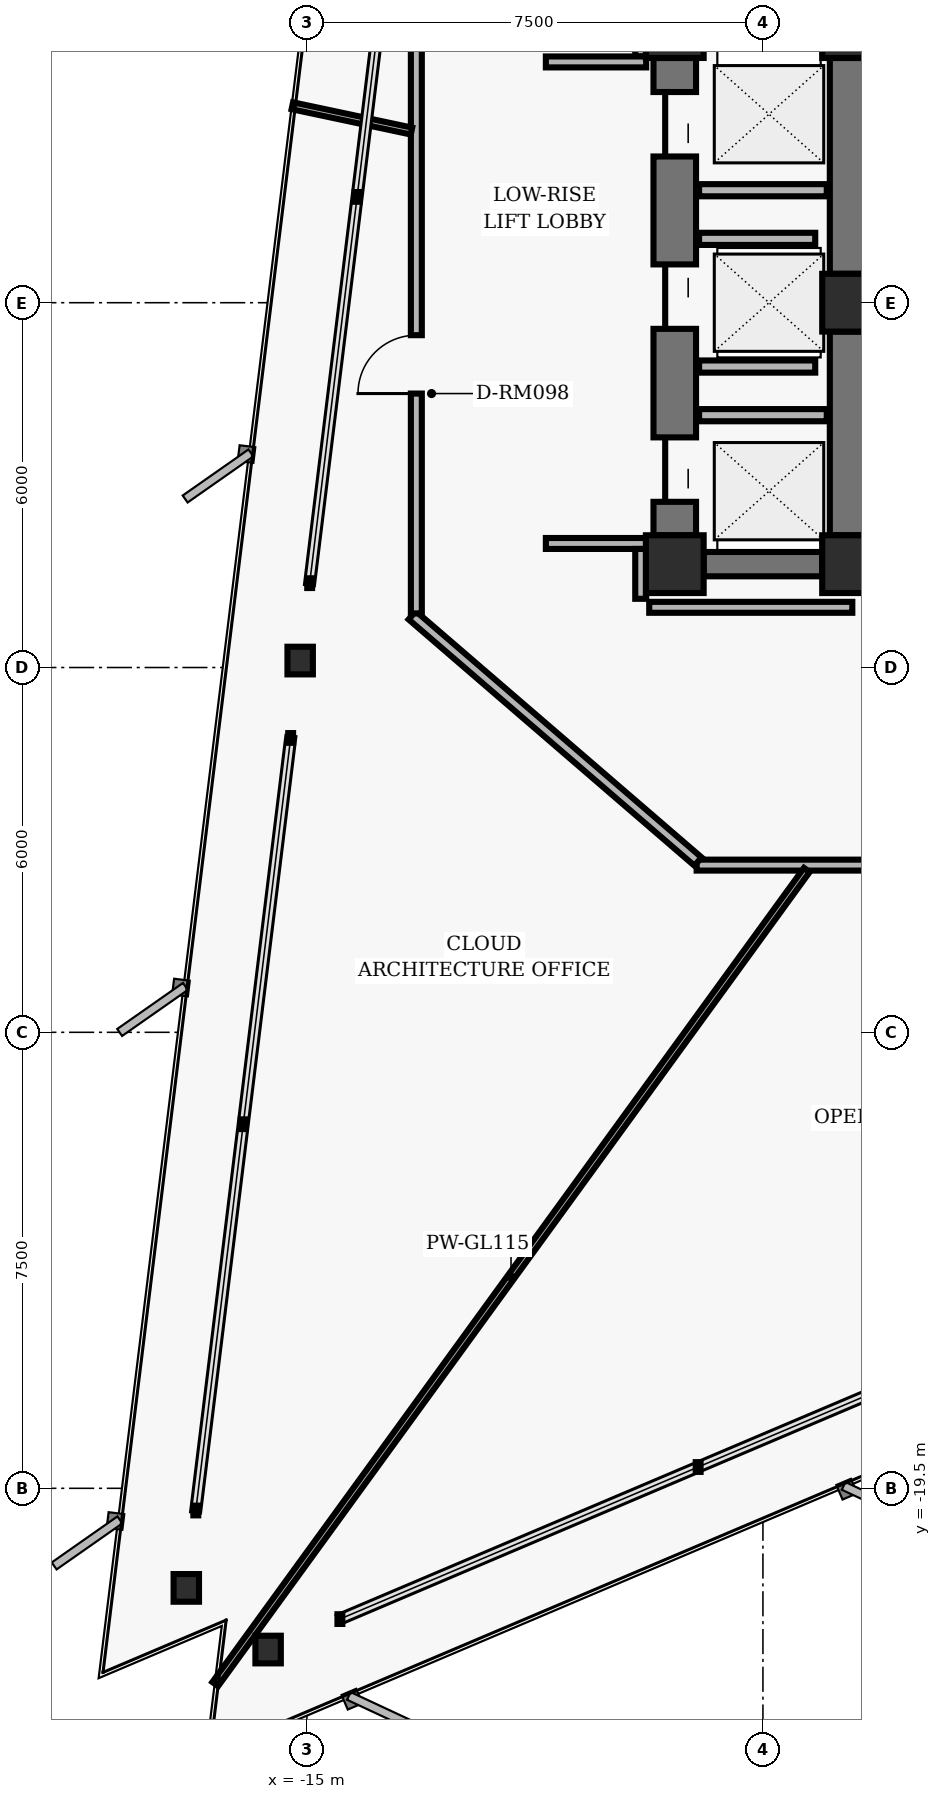
"""IFC4 building model, lengths in metres.
Left out: names, types, materials, properties, quantities, classifications, styles, units other than length and angle.
Written with IfcOpenShell. Run it as: python <this file> out.ifc"""

import sys

from ifc_helpers import new_model, si_unit, direction, frame, frame_2d, origin, origin_2d, place, context, subcontext, project, spatial, rectangle, hollow_rectangle, i_section, extrude, element, fill, save


model = new_model("IFC4")
c1 = context("Model", 3, precision=1e-05, world=origin(), true_north=direction((0.0, 1.0)))
c2 = subcontext(c1, "Body", "Model", "MODEL_VIEW")
j1 = project(units=[si_unit("LENGTHUNIT", "METRE"), si_unit("PLANEANGLEUNIT", "RADIAN")], contexts=[c1])
p1 = place(None, origin())
s1 = spatial("IfcSite", under=j1, at=p1, CompositionType="ELEMENT")
p2 = place(p1, origin())
s2 = spatial("IfcBuilding", under=s1, at=p2, CompositionType="ELEMENT")
p3 = place(p2, frame((0.0, 0.0, 73.12)))
s3 = spatial("IfcBuildingStorey", under=s2, at=p3, CompositionType="ELEMENT", Elevation=73.12)
for number, where, z_axis, x_axis in (
    (1, (-6.05, 4.5, 0.0), (0.0, 0.0, 1.0), (1.0, 0.0, 0.0)),
    (2, (-6.05, 0.0, 0.0), (0.0, 0.0, 1.0), (1.0, 0.0, 0.0)),
    (3, (-6.05, -4.3, 0.0), (0.0, 0.0, 1.0), (1.0, 0.0, 0.0)),
    (4, (-8.95, 4.5, 0.0), (0.0, 0.0, 1.0), (1.0, 0.0, 0.0)),
    (5, (-8.95, -4.3, 0.0), (0.0, 0.0, 1.0), (1.0, 0.0, 0.0)),
):
    element("IfcColumn", number, at=place(p3, frame(where, z_axis=z_axis, x_axis=x_axis)), inside=s3, PredefinedType="COLUMN", context=c2, shape_type="SweptSolid", body=[
        extrude(hollow_rectangle(XDim=0.95, YDim=0.95, WallThickness=0.06, InnerFilletRadius=0.02, OuterFilletRadius=0.04, at=origin_2d()), origin(), (0.0, 0.0, 1.0), 3.36),
    ])
p4 = place(p3, frame((-6.05, 0.475, 0.0), z_axis=(0.0, 0.0, 1.0), x_axis=(0.0, 1.0, 0.0)))
e6 = element("IfcWall", 6, at=p4, inside=s3, PredefinedType="SHEAR", context=c2, shape_type="SweptSolid", body=[
    extrude(rectangle(XDim=3.55, YDim=0.7, at=frame_2d((1.775, 0.0))), origin(), (0.0, 0.0, 1.0), 2.938),
])
p5 = place(p3, frame((-6.05, -3.825, 0.0), z_axis=(0.0, 0.0, 1.0), x_axis=(0.0, 1.0, 0.0)))
e7 = element("IfcWall", 7, at=p5, inside=s3, PredefinedType="SHEAR", context=c2, shape_type="SweptSolid", body=[
    extrude(rectangle(XDim=3.35, YDim=0.7, at=frame_2d((1.675, 0.0))), origin(), (0.0, 0.0, 1.0), 2.938),
])
p6 = place(p3, frame((-8.95, -3.825, 0.0), z_axis=(0.0, 0.0, 1.0), x_axis=(0.0, 1.0, 0.0)))
e8 = element("IfcWall", 8, at=p6, inside=s3, PredefinedType="SHEAR", context=c2, shape_type="SweptSolid", body=[
    extrude(rectangle(XDim=7.85, YDim=0.7, at=frame_2d((3.925, 0.0))), origin(), (0.0, 0.0, 1.0), 2.938),
])
p7 = place(p6, frame((0.55, 0.0, 0.0)))
e9 = element("IfcOpeningElement", 9, at=p7, cuts=e8, PredefinedType="OPENING", context=c2, shape_type="SweptSolid", body=[
    extrude(rectangle(XDim=1.06, YDim=2.04, at=frame_2d((0.53, 1.02))), frame((0.0, 0.36, 0.0), z_axis=(0.0, -1.0, 0.0), x_axis=(1.0, 0.0, 0.0)), (0.0, 0.0, 1.0), 0.72),
])
p8 = place(p6, frame((3.395, 0.0, 0.0)))
e10 = element("IfcOpeningElement", 10, at=p8, cuts=e8, PredefinedType="OPENING", context=c2, shape_type="SweptSolid", body=[
    extrude(rectangle(XDim=1.06, YDim=2.04, at=frame_2d((0.53, 1.02))), frame((0.0, 0.36, 0.0), z_axis=(0.0, -1.0, 0.0), x_axis=(1.0, 0.0, 0.0)), (0.0, 0.0, 1.0), 0.72),
])
p9 = place(p6, frame((6.23, 0.0, 0.0)))
e11 = element("IfcOpeningElement", 11, at=p9, cuts=e8, PredefinedType="OPENING", context=c2, shape_type="SweptSolid", body=[
    extrude(rectangle(XDim=1.06, YDim=2.04, at=frame_2d((0.53, 1.02))), frame((0.0, 0.36, 0.0), z_axis=(0.0, -1.0, 0.0), x_axis=(1.0, 0.0, 0.0)), (0.0, 0.0, 1.0), 0.72),
])
p10 = place(p3, frame((-8.475, -4.3, 0.0), z_axis=(0.0, 0.0, 1.0), x_axis=(1.0, 0.0, 0.0)))
e12 = element("IfcWall", 12, at=p10, inside=s3, PredefinedType="SHEAR", context=c2, shape_type="SweptSolid", body=[
    extrude(rectangle(XDim=1.95, YDim=0.4, at=frame_2d((0.975, 0.0))), origin(), (0.0, 0.0, 1.0), 2.938),
])
for number, where, z_axis, x_axis in (
    (13, (-15.111, -5.886, 0.0), (0.0, 0.0, 1.0), (1.0, 0.0, 0.0)),
    (14, (-16.983, -21.138, 0.0), (0.0, 0.0, 1.0), (1.0, 0.0, 0.0)),
    (15, (-15.638, -22.152, 0.0), (0.0, 0.0, 1.0), (1.0, 0.0, 0.0)),
):
    element("IfcColumn", number, at=place(p3, frame(where, z_axis=z_axis, x_axis=x_axis)), inside=s3, PredefinedType="COLUMN", context=c2, shape_type="SweptSolid", body=[
        extrude(i_section(OverallWidth=0.418, OverallDepth=0.455, WebThickness=0.042, FlangeThickness=0.068, FilletRadius=0.025, at=origin_2d()), origin(), (0.0, 0.0, 1.0), 3.36),
    ])
for number, where, z_axis, x_axis in (
    (16, (-8.55, -1.85, 0.0), (0.0, 0.0, 1.0), (1.0, 0.0, 0.0)),
    (17, (-8.55, 1.85, 0.0), (0.0, 0.0, 1.0), (1.0, 0.0, 0.0)),
):
    element("IfcWall", number, at=place(p3, frame(where, z_axis=z_axis, x_axis=x_axis)), inside=s3, PredefinedType="PARTITIONING", context=c2, shape_type="SweptSolid", body=[
        extrude(rectangle(XDim=2.1, YDim=0.2, at=frame_2d((1.05, 0.0))), origin(), (0.0, 0.0, 1.0), 2.913),
    ])
for number, where, z_axis, x_axis in (
    (18, (-8.55, -1.05, 0.0), (0.0, 0.0, 1.0), (1.0, 0.0, 0.0)),
    (19, (-8.55, 1.05, 0.0), (0.0, 0.0, 1.0), (1.0, 0.0, 0.0)),
):
    element("IfcWall", number, at=place(p3, frame(where, z_axis=z_axis, x_axis=x_axis)), inside=s3, PredefinedType="PARTITIONING", context=c2, shape_type="SweptSolid", body=[
        extrude(rectangle(XDim=1.91, YDim=0.2, at=frame_2d((0.955, 0.0))), origin(), (0.0, 0.0, 1.0), 2.913),
    ])
p11 = place(p3, frame((8.41, -9.25, 0.0), z_axis=(0.0, 0.0, 1.0), x_axis=(-1.0, 0.0, 0.0)))
e20 = element("IfcWall", 20, at=p11, inside=s3, PredefinedType="PARTITIONING", context=c2, shape_type="SweptSolid", body=[
    extrude(rectangle(XDim=17.0, YDim=0.18, at=frame_2d((8.5, 0.0))), origin(), (0.0, 0.0, 1.0), 2.427),
])
p12 = place(p11, frame((7.252, 0.0, 0.0)))
e21 = element("IfcOpeningElement", 21, at=p12, cuts=e20, PredefinedType="OPENING", context=c2, shape_type="SweptSolid", body=[
    extrude(rectangle(XDim=0.96, YDim=2.02, at=frame_2d((0.48, 1.01))), frame((0.0, 0.1, 0.0), z_axis=(0.0, -1.0, 0.0), x_axis=(1.0, 0.0, 0.0)), (0.0, 0.0, 1.0), 0.2),
])
p13 = place(p3, frame((-8.568, -9.191, 0.0), z_axis=(0.0, 0.0, 1.0), x_axis=(-0.757556899173, 0.652769135694, 0.0)))
e22 = element("IfcWall", 22, at=p13, inside=s3, PredefinedType="PARTITIONING", context=c2, shape_type="SweptSolid", body=[
    extrude(rectangle(XDim=6.204, YDim=0.18, at=frame_2d((3.102, 0.0))), origin(), (0.0, 0.0, 1.0), 2.913),
])
p14 = place(p3, frame((-13.2, -5.11, 0.0), z_axis=(0.0, 0.0, 1.0), x_axis=(0.0, 1.0, 0.0)))
e23 = element("IfcWall", 23, at=p14, inside=s3, PredefinedType="PARTITIONING", context=c2, shape_type="SweptSolid", body=[
    extrude(rectangle(XDim=10.22, YDim=0.18, at=frame_2d((5.11, 0.0))), origin(), (0.0, 0.0, 1.0), 2.427),
])
p15 = place(p14, frame((3.616, 0.0, 0.0)))
e24 = element("IfcOpeningElement", 24, at=p15, cuts=e23, PredefinedType="OPENING", context=c2, shape_type="SweptSolid", body=[
    extrude(rectangle(XDim=0.96, YDim=2.02, at=frame_2d((0.48, 1.01))), frame((0.0, 0.1, 0.0), z_axis=(0.0, -1.0, 0.0), x_axis=(1.0, 0.0, 0.0)), (0.0, 0.0, 1.0), 0.2),
])
p16 = place(p3, frame((-9.51, 4.87, 0.0), z_axis=(0.0, 0.0, 1.0), x_axis=(0.0, -1.0, 0.0)))
e25 = element("IfcWall", 25, at=p16, inside=s3, PredefinedType="PARTITIONING", context=c2, shape_type="SweptSolid", body=[
    extrude(rectangle(XDim=0.82, YDim=0.18, at=frame_2d((0.41, 0.0))), origin(), (0.0, 0.0, 1.0), 2.913),
])
for number, where, z_axis, x_axis in (
    (26, (-9.42, 3.96, 0.0), (0.0, 0.0, 1.0), (-1.0, 0.0, 0.0)),
    (27, (-11.07, -3.96, 0.0), (0.0, 0.0, 1.0), (1.0, 0.0, 0.0)),
):
    element("IfcWall", number, at=place(p3, frame(where, z_axis=z_axis, x_axis=x_axis)), inside=s3, PredefinedType="PARTITIONING", context=c2, shape_type="SweptSolid", body=[
        extrude(rectangle(XDim=1.65, YDim=0.18, at=frame_2d((0.825, 0.0))), origin(), (0.0, 0.0, 1.0), 2.913),
    ])
p17 = place(p3, frame((-9.51, -4.05, 0.0), z_axis=(0.0, 0.0, 1.0), x_axis=(0.0, -1.0, 0.0)))
e28 = element("IfcWall", 28, at=p17, inside=s3, PredefinedType="PARTITIONING", context=c2, shape_type="SweptSolid", body=[
    extrude(rectangle(XDim=0.82, YDim=0.18, at=frame_2d((0.41, 0.0))), origin(), (0.0, 0.0, 1.0), 2.913),
])
p18 = place(p3, frame((-9.37, -5.01, 0.0), z_axis=(0.0, 0.0, 1.0), x_axis=(1.0, 0.0, 0.0)))
e29 = element("IfcWall", 29, at=p18, inside=s3, PredefinedType="PARTITIONING", context=c2, shape_type="SweptSolid", body=[
    extrude(rectangle(XDim=3.34, YDim=0.18, at=frame_2d((1.67, 0.0))), origin(), (0.0, 0.0, 1.0), 2.913),
])
p19 = place(p3, frame((-6.779, -9.33, 0.0), z_axis=(0.0, 0.0, 1.0), x_axis=(-0.587788360635, -0.809014736023, 0.0)))
e30 = element("IfcWall", 30, at=p19, inside=s3, PredefinedType="MOVABLE", context=c2, shape_type="SweptSolid", body=[
    extrude(rectangle(XDim=16.552, YDim=0.115, at=frame_2d((8.276, 0.0))), origin(), (0.0, 0.0, 1.0), 2.198),
])
p20 = place(p3, frame((-13.28, 2.823, 0.0), z_axis=(0.0, 0.0, 1.0), x_axis=(-0.978147079353, 0.207914143705, 0.0)))
e31 = element("IfcWall", 31, at=p20, inside=s3, PredefinedType="MOVABLE", context=c2, shape_type="SweptSolid", body=[
    extrude(rectangle(XDim=2.003, YDim=0.115, at=frame_2d((1.001, 0.0))), origin(), (0.0, 0.0, 1.0), 2.913),
])
p21 = place(p7, origin())
e32 = element("IfcDoor", 32, at=p21, inside=s3, OperationType="SLIDING_TO_LEFT", PredefinedType="DOOR", context=c2, shape_type="SweptSolid", body=[
    extrude(rectangle(XDim=1.06, YDim=2.04, at=frame_2d((0.53, 1.02))), frame((0.0, 0.025, 0.0), z_axis=(0.0, -1.0, 0.0), x_axis=(1.0, 0.0, 0.0)), (0.0, 0.0, 1.0), 0.05),
])
fill(e9, e32)
p22 = place(p8, origin())
e33 = element("IfcDoor", 33, at=p22, inside=s3, OperationType="SLIDING_TO_RIGHT", PredefinedType="DOOR", context=c2, shape_type="SweptSolid", body=[
    extrude(rectangle(XDim=1.06, YDim=2.04, at=frame_2d((0.53, 1.02))), frame((0.0, 0.025, 0.0), z_axis=(0.0, -1.0, 0.0), x_axis=(1.0, 0.0, 0.0)), (0.0, 0.0, 1.0), 0.05),
])
fill(e10, e33)
p23 = place(p9, origin())
e34 = element("IfcDoor", 34, at=p23, inside=s3, OperationType="SLIDING_TO_LEFT", PredefinedType="DOOR", context=c2, shape_type="SweptSolid", body=[
    extrude(rectangle(XDim=1.06, YDim=2.04, at=frame_2d((0.53, 1.02))), frame((0.0, 0.025, 0.0), z_axis=(0.0, -1.0, 0.0), x_axis=(1.0, 0.0, 0.0)), (0.0, 0.0, 1.0), 0.05),
])
fill(e11, e34)
p24 = place(p15, origin())
e35 = element("IfcDoor", 35, at=p24, inside=s3, OperationType="SINGLE_SWING_LEFT", PredefinedType="DOOR", context=c2, shape_type="SweptSolid", body=[
    extrude(rectangle(XDim=0.96, YDim=2.02, at=frame_2d((0.48, 1.01))), frame((0.0, 0.025, 0.0), z_axis=(0.0, -1.0, 0.0), x_axis=(1.0, 0.0, 0.0)), (0.0, 0.0, 1.0), 0.05),
])
fill(e24, e35)
save(model, sys.argv[1])
